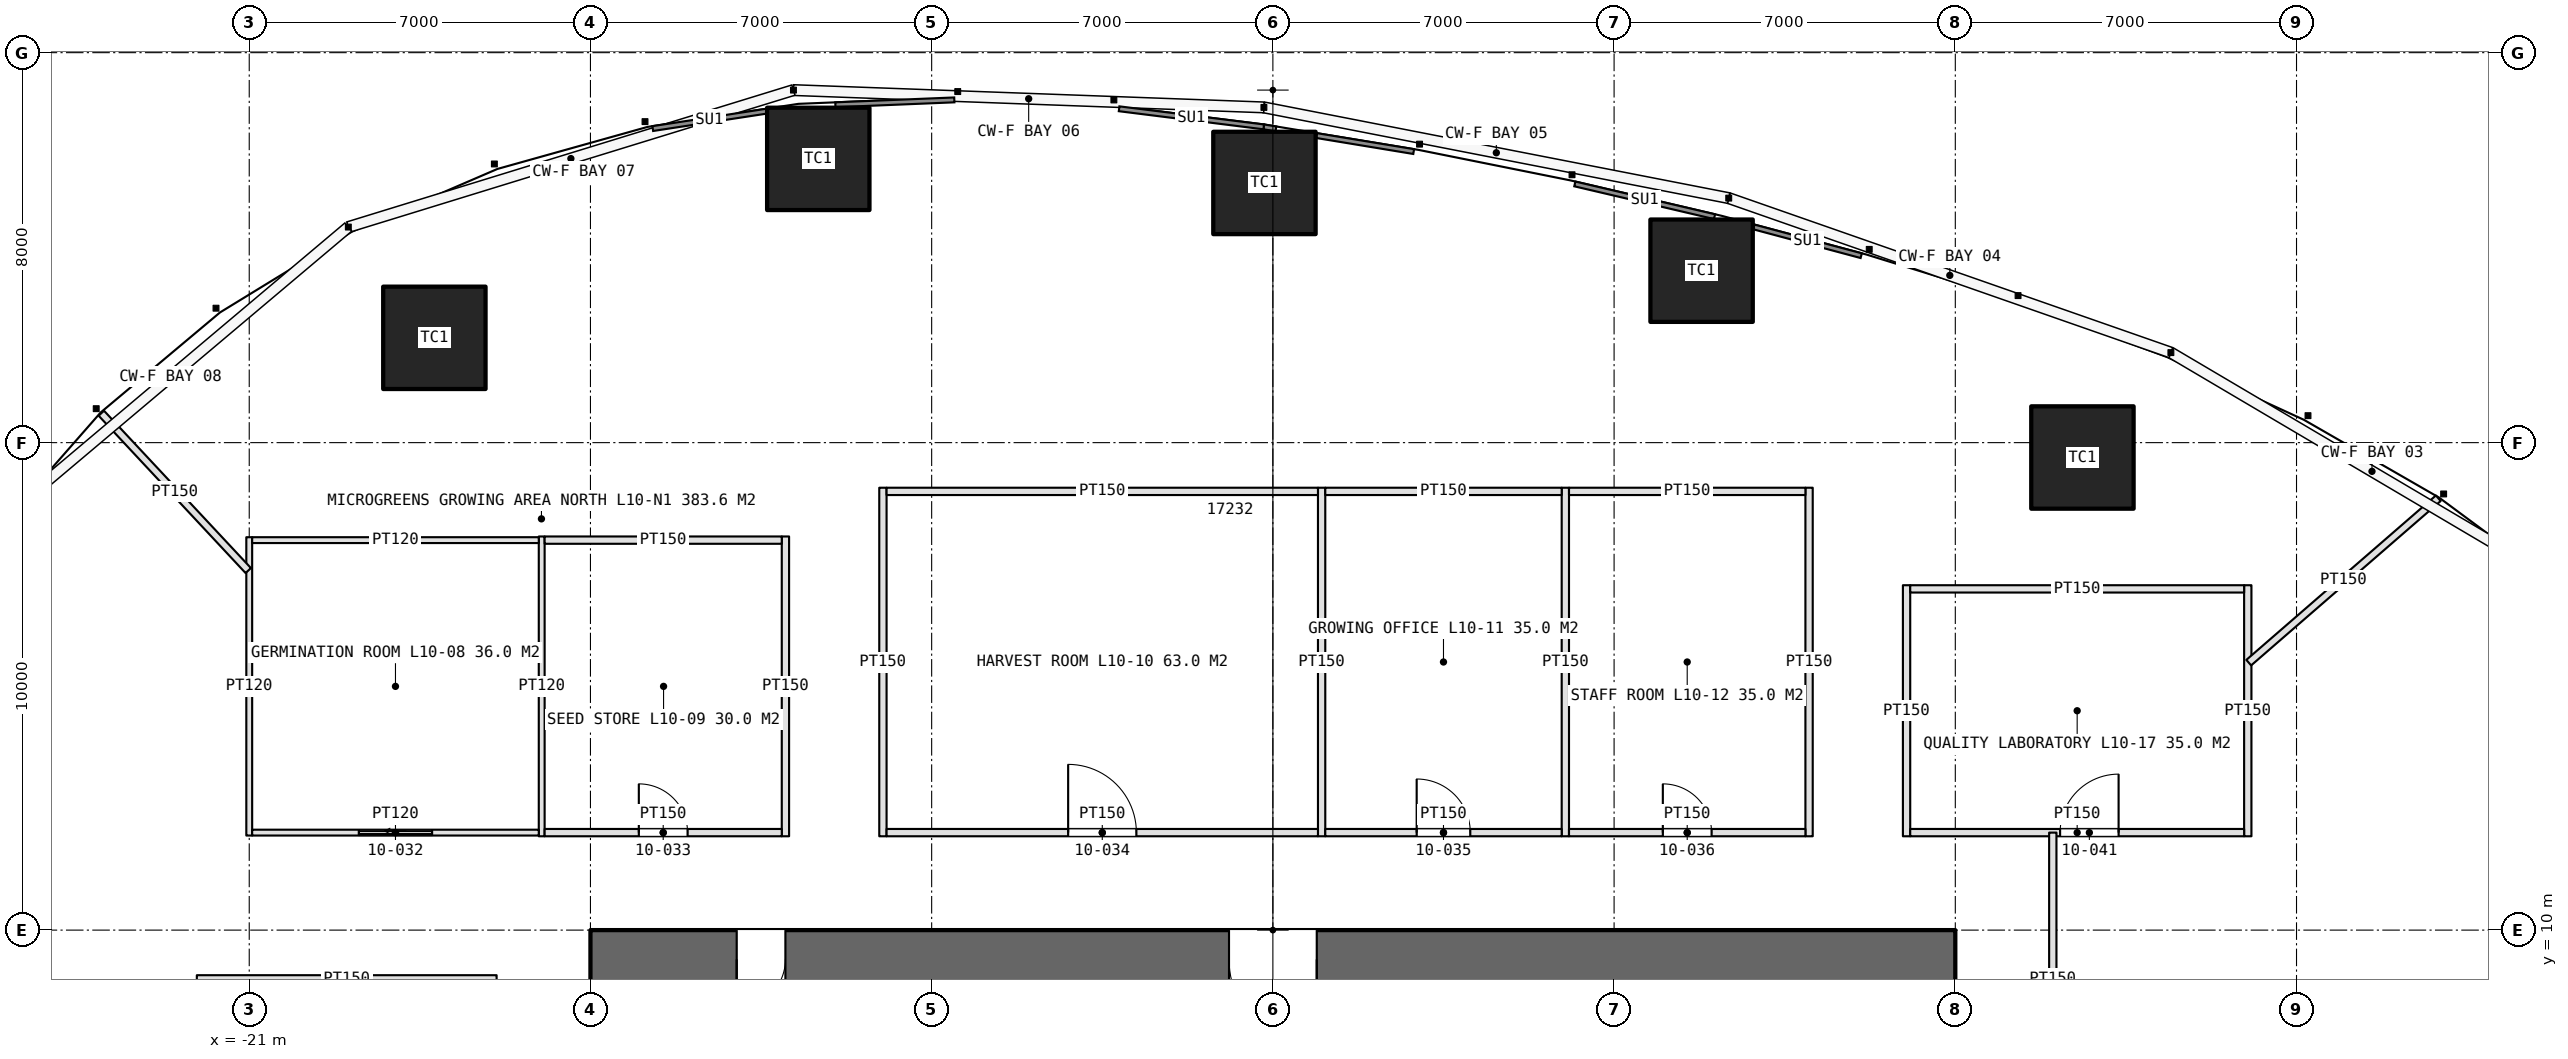
"""IFC4 building model, lengths in metres.
Left out: names, types, materials, properties, quantities, classifications, styles, units other than length and angle.
Written with IfcOpenShell. Run it as: python <this file> out.ifc"""

import sys

from ifc_helpers import new_model, si_unit, direction, frame, frame_2d, origin, origin_2d, place, context, subcontext, project, spatial, rectangle, extrude, element, fill, save


model = new_model("IFC4")
c1 = context("Model", 3, precision=1e-05, world=origin(), true_north=direction((0.0, 1.0)))
c2 = subcontext(c1, "Body", "Model", "MODEL_VIEW")
j1 = project(units=[si_unit("LENGTHUNIT", "METRE"), si_unit("PLANEANGLEUNIT", "RADIAN")], contexts=[c1])
p1 = place(None, origin())
s1 = spatial("IfcSite", under=j1, at=p1, CompositionType="ELEMENT")
p2 = place(p1, origin())
s2 = spatial("IfcBuilding", under=s1, at=p2, CompositionType="ELEMENT")
p3 = place(p2, frame((0.0, 0.0, 50.0)))
s3 = spatial("IfcBuildingStorey", under=s2, at=p3, CompositionType="ELEMENT", Elevation=50.0)
p4 = place(p3, frame((14.0, 9.4, 0.0), z_axis=(0.0, 0.0, 1.0), x_axis=(-1.0, 0.0, 0.0)))
e1 = element("IfcWall", 1, at=p4, inside=s3, PredefinedType="SHEAR", context=c2, shape_type="SweptSolid", body=[
    extrude(rectangle(XDim=28.0, YDim=1.2, at=frame_2d((14.0, 0.0))), origin(), (0.0, 0.0, 1.0), 5.0),
])
p5 = place(p4, frame((24.0, 0.0, 0.0)))
e2 = element("IfcOpeningElement", 2, at=p5, cuts=e1, PredefinedType="OPENING", context=c2, shape_type="SweptSolid", body=[
    extrude(rectangle(XDim=1.0, YDim=2.4, at=frame_2d((0.5, 1.2))), frame((0.0, 0.61, 0.0), z_axis=(0.0, -1.0, 0.0), x_axis=(1.0, 0.0, 0.0)), (0.0, 0.0, 1.0), 1.22),
])
p6 = place(p4, frame((13.1, 0.0, 0.0)))
e3 = element("IfcOpeningElement", 3, at=p6, cuts=e1, PredefinedType="OPENING", context=c2, shape_type="SweptSolid", body=[
    extrude(rectangle(XDim=1.8, YDim=2.4, at=frame_2d((0.9, 1.2))), frame((0.0, 0.61, 0.0), z_axis=(0.0, -1.0, 0.0), x_axis=(1.0, 0.0, 0.0)), (0.0, 0.0, 1.0), 1.22),
])
for number, where, z_axis, x_axis in (
    (4, (16.608, 19.695, 0.0), (0.0, 0.0, 1.0), (1.0, 0.0, 0.0)),
    (5, (8.795, 23.527, 0.0), (0.0, 0.0, 1.0), (1.0, 0.0, 0.0)),
    (6, (-0.173, 25.327, 0.0), (0.0, 0.0, 1.0), (1.0, 0.0, 0.0)),
    (7, (-9.326, 25.821, 0.0), (0.0, 0.0, 1.0), (1.0, 0.0, 0.0)),
    (8, (-17.202, 22.15, 0.0), (0.0, 0.0, 1.0), (1.0, 0.0, 0.0)),
):
    element("IfcColumn", number, at=place(p3, frame(where, z_axis=z_axis, x_axis=x_axis)), inside=s3, PredefinedType="COLUMN", context=c2, shape_type="SweptSolid", body=[
        extrude(rectangle(XDim=2.1, YDim=2.1, at=origin_2d()), origin(), (0.0, 0.0, 1.0), 5.0),
    ])
p7 = place(p3, frame((-21.0, 11.94, 0.0), z_axis=(0.0, 0.0, 1.0), x_axis=(0.0, 1.0, 0.0)))
e9 = element("IfcWall", 9, at=p7, inside=s3, PredefinedType="PARTITIONING", context=c2, shape_type="SweptSolid", body=[
    extrude(rectangle(XDim=6.12, YDim=0.12, at=frame_2d((3.06, 0.0))), origin(), (0.0, 0.0, 1.0), 3.6),
])
p8 = place(p3, frame((-15.0, 11.925, 0.0), z_axis=(0.0, 0.0, 1.0), x_axis=(0.0, 1.0, 0.0)))
e10 = element("IfcWall", 10, at=p8, inside=s3, PredefinedType="PARTITIONING", context=c2, shape_type="SweptSolid", body=[
    extrude(rectangle(XDim=6.15, YDim=0.12, at=frame_2d((3.075, 0.0))), origin(), (0.0, 0.0, 1.0), 3.6),
])
p9 = place(p3, frame((-10.0, 11.925, 0.0), z_axis=(0.0, 0.0, 1.0), x_axis=(0.0, 1.0, 0.0)))
e11 = element("IfcWall", 11, at=p9, inside=s3, PredefinedType="PARTITIONING", context=c2, shape_type="SweptSolid", body=[
    extrude(rectangle(XDim=6.15, YDim=0.15, at=frame_2d((3.075, 0.0))), origin(), (0.0, 0.0, 1.0), 3.6),
])
p10 = place(p3, frame((-20.94, 12.0, 0.0), z_axis=(0.0, 0.0, 1.0), x_axis=(1.0, 0.0, 0.0)))
e12 = element("IfcWall", 12, at=p10, inside=s3, PredefinedType="PARTITIONING", context=c2, shape_type="SweptSolid", body=[
    extrude(rectangle(XDim=5.88, YDim=0.12, at=frame_2d((2.94, 0.0))), origin(), (0.0, 0.0, 1.0), 3.6),
])
p11 = place(p10, frame((2.19, 0.0, 0.0)))
e13 = element("IfcOpeningElement", 13, at=p11, cuts=e12, PredefinedType="OPENING", context=c2, shape_type="SweptSolid", body=[
    extrude(rectangle(XDim=1.5, YDim=2.5, at=frame_2d((0.75, 1.25))), frame((0.0, 0.07, 0.0), z_axis=(0.0, -1.0, 0.0), x_axis=(1.0, 0.0, 0.0)), (0.0, 0.0, 1.0), 0.14),
])
p12 = place(p3, frame((-20.94, 18.0, 0.0), z_axis=(0.0, 0.0, 1.0), x_axis=(1.0, 0.0, 0.0)))
e14 = element("IfcWall", 14, at=p12, inside=s3, PredefinedType="PARTITIONING", context=c2, shape_type="SweptSolid", body=[
    extrude(rectangle(XDim=5.88, YDim=0.12, at=frame_2d((2.94, 0.0))), origin(), (0.0, 0.0, 1.0), 3.6),
])
p13 = place(p3, frame((-14.94, 12.0, 0.0), z_axis=(0.0, 0.0, 1.0), x_axis=(1.0, 0.0, 0.0)))
e15 = element("IfcWall", 15, at=p13, inside=s3, PredefinedType="PARTITIONING", context=c2, shape_type="SweptSolid", body=[
    extrude(rectangle(XDim=4.865, YDim=0.15, at=frame_2d((2.433, 0.0))), origin(), (0.0, 0.0, 1.0), 3.6),
])
p14 = place(p13, frame((1.933, 0.0, 0.0)))
e16 = element("IfcOpeningElement", 16, at=p14, cuts=e15, PredefinedType="OPENING", context=c2, shape_type="SweptSolid", body=[
    extrude(rectangle(XDim=1.0, YDim=2.2, at=frame_2d((0.5, 1.1))), frame((0.0, 0.085, 0.0), z_axis=(0.0, -1.0, 0.0), x_axis=(1.0, 0.0, 0.0)), (0.0, 0.0, 1.0), 0.17),
])
p15 = place(p3, frame((-14.94, 18.0, 0.0), z_axis=(0.0, 0.0, 1.0), x_axis=(1.0, 0.0, 0.0)))
e17 = element("IfcWall", 17, at=p15, inside=s3, PredefinedType="PARTITIONING", context=c2, shape_type="SweptSolid", body=[
    extrude(rectangle(XDim=4.865, YDim=0.15, at=frame_2d((2.433, 0.0))), origin(), (0.0, 0.0, 1.0), 3.6),
])
for number, where, z_axis, x_axis in (
    (18, (-8.0, 11.925, 0.0), (0.0, 0.0, 1.0), (0.0, 1.0, 0.0)),
    (19, (1.0, 11.925, 0.0), (0.0, 0.0, 1.0), (0.0, 1.0, 0.0)),
    (20, (6.0, 11.925, 0.0), (0.0, 0.0, 1.0), (0.0, 1.0, 0.0)),
    (21, (11.0, 11.925, 0.0), (0.0, 0.0, 1.0), (0.0, 1.0, 0.0)),
):
    element("IfcWall", number, at=place(p3, frame(where, z_axis=z_axis, x_axis=x_axis)), inside=s3, PredefinedType="PARTITIONING", context=c2, shape_type="SweptSolid", body=[
        extrude(rectangle(XDim=7.15, YDim=0.15, at=frame_2d((3.575, 0.0))), origin(), (0.0, 0.0, 1.0), 3.6),
    ])
p16 = place(p3, frame((-7.925, 12.0, 0.0), z_axis=(0.0, 0.0, 1.0), x_axis=(1.0, 0.0, 0.0)))
e22 = element("IfcWall", 22, at=p16, inside=s3, PredefinedType="PARTITIONING", context=c2, shape_type="SweptSolid", body=[
    extrude(rectangle(XDim=8.85, YDim=0.15, at=frame_2d((4.425, 0.0))), origin(), (0.0, 0.0, 1.0), 3.6),
])
p17 = place(p16, frame((3.725, 0.0, 0.0)))
e23 = element("IfcOpeningElement", 23, at=p17, cuts=e22, PredefinedType="OPENING", context=c2, shape_type="SweptSolid", body=[
    extrude(rectangle(XDim=1.4, YDim=2.4, at=frame_2d((0.7, 1.2))), frame((0.0, 0.085, 0.0), z_axis=(0.0, -1.0, 0.0), x_axis=(1.0, 0.0, 0.0)), (0.0, 0.0, 1.0), 0.17),
])
p18 = place(p3, frame((-7.925, 19.0, 0.0), z_axis=(0.0, 0.0, 1.0), x_axis=(1.0, 0.0, 0.0)))
e24 = element("IfcWall", 24, at=p18, inside=s3, PredefinedType="PARTITIONING", context=c2, shape_type="SweptSolid", body=[
    extrude(rectangle(XDim=8.85, YDim=0.15, at=frame_2d((4.425, 0.0))), origin(), (0.0, 0.0, 1.0), 3.6),
])
p19 = place(p3, frame((1.075, 12.0, 0.0), z_axis=(0.0, 0.0, 1.0), x_axis=(1.0, 0.0, 0.0)))
e25 = element("IfcWall", 25, at=p19, inside=s3, PredefinedType="PARTITIONING", context=c2, shape_type="SweptSolid", body=[
    extrude(rectangle(XDim=4.85, YDim=0.15, at=frame_2d((2.425, 0.0))), origin(), (0.0, 0.0, 1.0), 3.6),
])
p20 = place(p19, frame((1.875, 0.0, 0.0)))
e26 = element("IfcOpeningElement", 26, at=p20, cuts=e25, PredefinedType="OPENING", context=c2, shape_type="SweptSolid", body=[
    extrude(rectangle(XDim=1.1, YDim=2.3, at=frame_2d((0.55, 1.15))), frame((0.0, 0.085, 0.0), z_axis=(0.0, -1.0, 0.0), x_axis=(1.0, 0.0, 0.0)), (0.0, 0.0, 1.0), 0.17),
])
p21 = place(p3, frame((1.075, 19.0, 0.0), z_axis=(0.0, 0.0, 1.0), x_axis=(1.0, 0.0, 0.0)))
e27 = element("IfcWall", 27, at=p21, inside=s3, PredefinedType="PARTITIONING", context=c2, shape_type="SweptSolid", body=[
    extrude(rectangle(XDim=4.85, YDim=0.15, at=frame_2d((2.425, 0.0))), origin(), (0.0, 0.0, 1.0), 3.6),
])
p22 = place(p3, frame((6.075, 12.0, 0.0), z_axis=(0.0, 0.0, 1.0), x_axis=(1.0, 0.0, 0.0)))
e28 = element("IfcWall", 28, at=p22, inside=s3, PredefinedType="PARTITIONING", context=c2, shape_type="SweptSolid", body=[
    extrude(rectangle(XDim=4.85, YDim=0.15, at=frame_2d((2.425, 0.0))), origin(), (0.0, 0.0, 1.0), 3.6),
])
p23 = place(p22, frame((1.925, 0.0, 0.0)))
e29 = element("IfcOpeningElement", 29, at=p23, cuts=e28, PredefinedType="OPENING", context=c2, shape_type="SweptSolid", body=[
    extrude(rectangle(XDim=1.0, YDim=2.2, at=frame_2d((0.5, 1.1))), frame((0.0, 0.085, 0.0), z_axis=(0.0, -1.0, 0.0), x_axis=(1.0, 0.0, 0.0)), (0.0, 0.0, 1.0), 0.17),
])
p24 = place(p3, frame((6.075, 19.0, 0.0), z_axis=(0.0, 0.0, 1.0), x_axis=(1.0, 0.0, 0.0)))
e30 = element("IfcWall", 30, at=p24, inside=s3, PredefinedType="PARTITIONING", context=c2, shape_type="SweptSolid", body=[
    extrude(rectangle(XDim=4.85, YDim=0.15, at=frame_2d((2.425, 0.0))), origin(), (0.0, 0.0, 1.0), 3.6),
])
p25 = place(p3, frame((-15.925, 9.0, 0.0), z_axis=(0.0, 0.0, 1.0), x_axis=(-1.0, 0.0, 0.0)))
e31 = element("IfcWall", 31, at=p25, inside=s3, PredefinedType="PARTITIONING", context=c2, shape_type="SweptSolid", body=[
    extrude(rectangle(XDim=6.15, YDim=0.15, at=frame_2d((3.075, 0.0))), origin(), (0.0, 0.0, 1.0), 3.6),
])
for number, where, z_axis, x_axis in (
    (32, (13.0, 11.925, 0.0), (0.0, 0.0, 1.0), (0.0, 1.0, 0.0)),
    (33, (20.0, 11.925, 0.0), (0.0, 0.0, 1.0), (0.0, 1.0, 0.0)),
):
    element("IfcWall", number, at=place(p3, frame(where, z_axis=z_axis, x_axis=x_axis)), inside=s3, PredefinedType="PARTITIONING", context=c2, shape_type="SweptSolid", body=[
        extrude(rectangle(XDim=5.15, YDim=0.15, at=frame_2d((2.575, 0.0))), origin(), (0.0, 0.0, 1.0), 3.6),
    ])
p26 = place(p3, frame((13.075, 12.0, 0.0), z_axis=(0.0, 0.0, 1.0), x_axis=(1.0, 0.0, 0.0)))
e34 = element("IfcWall", 34, at=p26, inside=s3, PredefinedType="PARTITIONING", context=c2, shape_type="SweptSolid", body=[
    extrude(rectangle(XDim=6.85, YDim=0.15, at=frame_2d((3.425, 0.0))), origin(), (0.0, 0.0, 1.0), 3.6),
])
p27 = place(p26, frame((3.075, 0.0, 0.0)))
e35 = element("IfcOpeningElement", 35, at=p27, cuts=e34, PredefinedType="OPENING", context=c2, shape_type="SweptSolid", body=[
    extrude(rectangle(XDim=1.2, YDim=2.3, at=frame_2d((0.6, 1.15))), frame((0.0, 0.085, 0.0), z_axis=(0.0, -1.0, 0.0), x_axis=(1.0, 0.0, 0.0)), (0.0, 0.0, 1.0), 0.17),
])
p28 = place(p3, frame((13.075, 17.0, 0.0), z_axis=(0.0, 0.0, 1.0), x_axis=(1.0, 0.0, 0.0)))
e36 = element("IfcWall", 36, at=p28, inside=s3, PredefinedType="PARTITIONING", context=c2, shape_type="SweptSolid", body=[
    extrude(rectangle(XDim=6.85, YDim=0.15, at=frame_2d((3.425, 0.0))), origin(), (0.0, 0.0, 1.0), 3.6),
])
p29 = place(p3, frame((-21.02, 17.375, 0.0), z_axis=(0.0, 0.0, 1.0), x_axis=(-0.682511222631, 0.730875113123, 0.0)))
e37 = element("IfcWall", 37, at=p29, inside=s3, PredefinedType="PARTITIONING", context=c2, shape_type="SweptSolid", body=[
    extrude(rectangle(XDim=4.417, YDim=0.15, at=frame_2d((2.208, 0.0))), origin(), (0.0, 0.0, 1.0), 3.6),
])
p30 = place(p3, frame((20.02, 15.487, 0.0), z_axis=(0.0, 0.0, 1.0), x_axis=(0.755443308786, 0.655214016342, 0.0)))
e38 = element("IfcWall", 38, at=p30, inside=s3, PredefinedType="PARTITIONING", context=c2, shape_type="SweptSolid", body=[
    extrude(rectangle(XDim=5.147, YDim=0.15, at=frame_2d((2.573, 0.0))), origin(), (0.0, 0.0, 1.0), 3.6),
])
p31 = place(p3, frame((16.0, 6.0, 0.0), z_axis=(0.0, 0.0, 1.0), x_axis=(0.0, 1.0, 0.0)))
e39 = element("IfcWall", 39, at=p31, inside=s3, PredefinedType="PARTITIONING", context=c2, shape_type="SweptSolid", body=[
    extrude(rectangle(XDim=6.0, YDim=0.15, at=frame_2d((3.0, 0.0))), origin(), (0.0, 0.0, 1.0), 3.6),
])
p32 = place(p5, origin())
e40 = element("IfcDoor", 40, at=p32, inside=s3, OperationType="SINGLE_SWING_RIGHT", PredefinedType="DOOR", context=c2, shape_type="SweptSolid", body=[
    extrude(rectangle(XDim=1.0, YDim=2.4, at=frame_2d((0.5, 1.2))), frame((0.0, 0.025, 0.0), z_axis=(0.0, -1.0, 0.0), x_axis=(1.0, 0.0, 0.0)), (0.0, 0.0, 1.0), 0.05),
])
fill(e2, e40)
p33 = place(p6, origin())
e41 = element("IfcDoor", 41, at=p33, inside=s3, OperationType="DOUBLE_DOOR_SINGLE_SWING", PredefinedType="DOOR", context=c2, shape_type="SweptSolid", body=[
    extrude(rectangle(XDim=1.8, YDim=2.4, at=frame_2d((0.9, 1.2))), frame((0.0, 0.025, 0.0), z_axis=(0.0, -1.0, 0.0), x_axis=(1.0, 0.0, 0.0)), (0.0, 0.0, 1.0), 0.05),
])
fill(e3, e41)
p34 = place(p11, origin())
e42 = element("IfcDoor", 42, at=p34, inside=s3, OperationType="SLIDING_TO_LEFT", PredefinedType="DOOR", context=c2, shape_type="SweptSolid", body=[
    extrude(rectangle(XDim=1.5, YDim=2.5, at=frame_2d((0.75, 1.25))), frame((0.0, 0.025, 0.0), z_axis=(0.0, -1.0, 0.0), x_axis=(1.0, 0.0, 0.0)), (0.0, 0.0, 1.0), 0.05),
])
fill(e13, e42)
p35 = place(p14, origin())
e43 = element("IfcDoor", 43, at=p35, inside=s3, OperationType="SINGLE_SWING_LEFT", PredefinedType="DOOR", context=c2, shape_type="SweptSolid", body=[
    extrude(rectangle(XDim=1.0, YDim=2.2, at=frame_2d((0.5, 1.1))), frame((0.0, 0.025, 0.0), z_axis=(0.0, -1.0, 0.0), x_axis=(1.0, 0.0, 0.0)), (0.0, 0.0, 1.0), 0.05),
])
fill(e16, e43)
p36 = place(p17, origin())
e44 = element("IfcDoor", 44, at=p36, inside=s3, OperationType="DOUBLE_DOOR_DOUBLE_SWING", PredefinedType="DOOR", context=c2, shape_type="SweptSolid", body=[
    extrude(rectangle(XDim=1.4, YDim=2.4, at=frame_2d((0.7, 1.2))), frame((0.0, 0.025, 0.0), z_axis=(0.0, -1.0, 0.0), x_axis=(1.0, 0.0, 0.0)), (0.0, 0.0, 1.0), 0.05),
])
fill(e23, e44)
p37 = place(p20, origin())
e45 = element("IfcDoor", 45, at=p37, inside=s3, OperationType="SINGLE_SWING_LEFT", PredefinedType="DOOR", context=c2, shape_type="SweptSolid", body=[
    extrude(rectangle(XDim=1.1, YDim=2.3, at=frame_2d((0.55, 1.15))), frame((0.0, 0.025, 0.0), z_axis=(0.0, -1.0, 0.0), x_axis=(1.0, 0.0, 0.0)), (0.0, 0.0, 1.0), 0.05),
])
fill(e26, e45)
p38 = place(p23, origin())
e46 = element("IfcDoor", 46, at=p38, inside=s3, OperationType="SINGLE_SWING_LEFT", PredefinedType="DOOR", context=c2, shape_type="SweptSolid", body=[
    extrude(rectangle(XDim=1.0, YDim=2.2, at=frame_2d((0.5, 1.1))), frame((0.0, 0.025, 0.0), z_axis=(0.0, -1.0, 0.0), x_axis=(1.0, 0.0, 0.0)), (0.0, 0.0, 1.0), 0.05),
])
fill(e29, e46)
p39 = place(p27, origin())
e47 = element("IfcDoor", 47, at=p39, inside=s3, OperationType="SINGLE_SWING_RIGHT", PredefinedType="DOOR", context=c2, shape_type="SweptSolid", body=[
    extrude(rectangle(XDim=1.2, YDim=2.3, at=frame_2d((0.6, 1.15))), frame((0.0, 0.025, 0.0), z_axis=(0.0, -1.0, 0.0), x_axis=(1.0, 0.0, 0.0)), (0.0, 0.0, 1.0), 0.05),
])
fill(e35, e47)
save(model, sys.argv[1])
